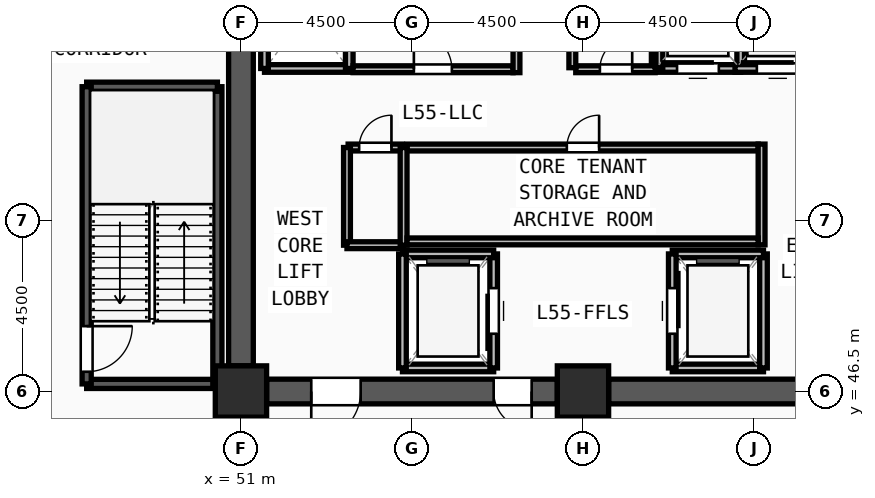
"""IFC4 building model, lengths in metres.
Left out: names, types, materials, properties, quantities, classifications, styles, units other than length and angle.
Written with IfcOpenShell. Run it as: python <this file> out.ifc"""

import sys

from ifc_helpers import new_model, si_unit, direction, frame, frame_2d, origin, origin_2d, place, context, subcontext, project, spatial, rectangle, extrude, source, transform, mapped, element, fill, save


model = new_model("IFC4")
c1 = context("Model", 3, precision=1e-05, world=origin(), true_north=direction((0.0, 1.0)))
c2 = subcontext(c1, "Body", "Model", "MODEL_VIEW")
j1 = project(units=[si_unit("LENGTHUNIT", "METRE"), si_unit("PLANEANGLEUNIT", "RADIAN")], contexts=[c1])
p1 = place(None, origin())
s1 = spatial("IfcSite", under=j1, at=p1, CompositionType="ELEMENT")
p2 = place(p1, origin())
s2 = spatial("IfcBuilding", under=s1, at=p2, CompositionType="ELEMENT")
p3 = place(p2, frame((0.0, 0.0, 213.0)))
s3 = spatial("IfcBuildingStorey", under=s2, at=p3, CompositionType="ELEMENT", Elevation=213.0)
m1 = source(origin(), c2, "Body", "SweptSolid", [
    extrude(rectangle(XDim=1.35, YDim=1.35, at=origin_2d()), origin(), (0.0, 0.0, 1.0), 3.75),
])
for number, where, z_axis, x_axis in (
    (1, (51.0, 46.5, 0.0), (0.0, 0.0, 1.0), (1.0, 0.0, 0.0)),
    (2, (60.0, 46.5, 0.0), (0.0, 0.0, 1.0), (1.0, 0.0, 0.0)),
):
    element("IfcColumn", number, at=place(p3, frame(where, z_axis=z_axis, x_axis=x_axis)), inside=s3, PredefinedType="COLUMN", context=c2, shape_type="MappedRepresentation", body=[
        mapped(m1, transform((0.0, 0.0, 0.0), x_axis=(1.0, 0.0, 0.0), y_axis=(0.0, 1.0, 0.0), z_axis=(0.0, 0.0, 1.0), scale=1.0)),
    ])
p4 = place(p3, frame((68.325, 46.5, 0.0), z_axis=(0.0, 0.0, 1.0), x_axis=(-1.0, 0.0, 0.0)))
e3 = element("IfcWall", 3, at=p4, inside=s3, PredefinedType="SHEAR", context=c2, shape_type="SweptSolid", body=[
    extrude(rectangle(XDim=7.65, YDim=0.65, at=frame_2d((3.825, 0.0))), origin(), (0.0, 0.0, 1.0), 3.57),
])
m2 = source(origin(), c2, "Body", "SweptSolid", [
    extrude(rectangle(XDim=1.3, YDim=2.2, at=frame_2d((0.65, 1.1))), frame((0.0, 0.335, 0.0), z_axis=(0.0, -1.0, 0.0), x_axis=(1.0, 0.0, 0.0)), (0.0, 0.0, 1.0), 0.67),
])
p5 = place(p4, frame((1.175, 0.0, 0.0)))
e4 = element("IfcOpeningElement", 4, at=p5, cuts=e3, PredefinedType="OPENING", context=c2, shape_type="MappedRepresentation", body=[
    mapped(m2, transform((0.0, 0.0, 0.0), x_axis=(1.0, 0.0, 0.0), y_axis=(0.0, 1.0, 0.0), z_axis=(0.0, 0.0, 1.0), scale=1.0)),
])
p6 = place(p3, frame((59.325, 46.5, 0.0), z_axis=(0.0, 0.0, 1.0), x_axis=(-1.0, 0.0, 0.0)))
e5 = element("IfcWall", 5, at=p6, inside=s3, PredefinedType="SHEAR", context=c2, shape_type="SweptSolid", body=[
    extrude(rectangle(XDim=7.65, YDim=0.65, at=frame_2d((3.825, 0.0))), origin(), (0.0, 0.0, 1.0), 3.57),
])
p7 = place(p6, frame((5.175, 0.0, 0.0)))
e6 = element("IfcOpeningElement", 6, at=p7, cuts=e5, PredefinedType="OPENING", context=c2, shape_type="MappedRepresentation", body=[
    mapped(m2, transform((0.0, 0.0, 0.0), x_axis=(1.0, 0.0, 0.0), y_axis=(0.0, 1.0, 0.0), z_axis=(0.0, 0.0, 1.0), scale=1.0)),
])
m3 = source(origin(), c2, "Body", "SweptSolid", [
    extrude(rectangle(XDim=1.0, YDim=2.2, at=frame_2d((0.5, 1.1))), frame((0.0, 0.335, 0.0), z_axis=(0.0, -1.0, 0.0), x_axis=(1.0, 0.0, 0.0)), (0.0, 0.0, 1.0), 0.67),
])
p8 = place(p6, frame((0.675, 0.0, 0.0)))
e7 = element("IfcOpeningElement", 7, at=p8, cuts=e5, PredefinedType="OPENING", context=c2, shape_type="MappedRepresentation", body=[
    mapped(m3, transform((0.0, 0.0, 0.0), x_axis=(1.0, 0.0, 0.0), y_axis=(0.0, 1.0, 0.0), z_axis=(0.0, 0.0, 1.0), scale=1.0)),
])
p9 = place(p3, frame((51.0, 47.175, 0.0), z_axis=(0.0, 0.0, 1.0), x_axis=(0.0, 1.0, 0.0)))
e8 = element("IfcWall", 8, at=p9, inside=s3, PredefinedType="SHEAR", context=c2, shape_type="SweptSolid", body=[
    extrude(rectangle(XDim=13.65, YDim=0.65, at=frame_2d((6.825, 0.0))), origin(), (0.0, 0.0, 1.0), 3.57),
])
p10 = place(p3, frame((46.94, 46.7, 0.0), z_axis=(0.0, 0.0, 1.0), x_axis=(1.0, 0.0, 0.0)))
e9 = element("IfcWall", 9, at=p10, inside=s3, PredefinedType="SOLIDWALL", context=c2, shape_type="SweptSolid", body=[
    extrude(rectangle(XDim=3.44, YDim=0.24, at=frame_2d((1.72, 0.0))), origin(), (0.0, 0.0, 1.0), 3.57),
])
p11 = place(p3, frame((50.38, 46.7, 0.0), z_axis=(0.0, 0.0, 1.0), x_axis=(0.0, 1.0, 0.0)))
e10 = element("IfcWall", 10, at=p11, inside=s3, PredefinedType="SOLIDWALL", context=c2, shape_type="SweptSolid", body=[
    extrude(rectangle(XDim=7.82, YDim=0.24, at=frame_2d((3.91, 0.0))), origin(), (0.0, 0.0, 1.0), 3.57),
])
p12 = place(p3, frame((50.38, 54.52, 0.0), z_axis=(0.0, 0.0, 1.0), x_axis=(-1.0, 0.0, 0.0)))
e11 = element("IfcWall", 11, at=p12, inside=s3, PredefinedType="SOLIDWALL", context=c2, shape_type="SweptSolid", body=[
    extrude(rectangle(XDim=3.44, YDim=0.24, at=frame_2d((1.72, 0.0))), origin(), (0.0, 0.0, 1.0), 3.57),
])
p13 = place(p3, frame((46.94, 54.52, 0.0), z_axis=(0.0, 0.0, 1.0), x_axis=(0.0, -1.0, 0.0)))
e12 = element("IfcWall", 12, at=p13, inside=s3, PredefinedType="SOLIDWALL", context=c2, shape_type="SweptSolid", body=[
    extrude(rectangle(XDim=7.82, YDim=0.24, at=frame_2d((3.91, 0.0))), origin(), (0.0, 0.0, 1.0), 3.57),
])
m4 = source(origin(), c2, "Body", "SweptSolid", [
    extrude(rectangle(XDim=1.2, YDim=2.2, at=frame_2d((0.6, 1.1))), frame((0.0, 0.13, 0.0), z_axis=(0.0, -1.0, 0.0), x_axis=(1.0, 0.0, 0.0)), (0.0, 0.0, 1.0), 0.26),
])
p14 = place(p13, frame((6.3, 0.0, 0.0)))
e13 = element("IfcOpeningElement", 13, at=p14, cuts=e12, PredefinedType="OPENING", context=c2, shape_type="MappedRepresentation", body=[
    mapped(m4, transform((0.0, 0.0, 0.0), x_axis=(1.0, 0.0, 0.0), y_axis=(0.0, 1.0, 0.0), z_axis=(0.0, 0.0, 1.0), scale=1.0)),
])
p15 = place(p3, frame((55.25, 47.12, 0.0), z_axis=(0.0, 0.0, 1.0), x_axis=(1.0, 0.0, 0.0)))
e14 = element("IfcWall", 14, at=p15, inside=s3, PredefinedType="SOLIDWALL", context=c2, shape_type="SweptSolid", body=[
    extrude(rectangle(XDim=2.4, YDim=0.2, at=frame_2d((1.2, 0.0))), origin(), (0.0, 0.0, 1.0), 3.57),
])
p16 = place(p3, frame((57.65, 47.12, 0.0), z_axis=(0.0, 0.0, 1.0), x_axis=(0.0, 1.0, 0.0)))
e15 = element("IfcWall", 15, at=p16, inside=s3, PredefinedType="SOLIDWALL", context=c2, shape_type="SweptSolid", body=[
    extrude(rectangle(XDim=3.0, YDim=0.2, at=frame_2d((1.5, 0.0))), origin(), (0.0, 0.0, 1.0), 3.57),
])
m5 = source(origin(), c2, "Body", "SweptSolid", [
    extrude(rectangle(XDim=1.2, YDim=2.3, at=frame_2d((0.6, 1.15))), frame((0.0, 0.11, 0.0), z_axis=(0.0, -1.0, 0.0), x_axis=(1.0, 0.0, 0.0)), (0.0, 0.0, 1.0), 0.22),
])
p17 = place(p16, frame((0.9, 0.0, 0.0)))
e16 = element("IfcOpeningElement", 16, at=p17, cuts=e15, PredefinedType="OPENING", context=c2, shape_type="MappedRepresentation", body=[
    mapped(m5, transform((0.0, 0.0, 0.0), x_axis=(1.0, 0.0, 0.0), y_axis=(0.0, 1.0, 0.0), z_axis=(0.0, 0.0, 1.0), scale=1.0)),
])
p18 = place(p3, frame((57.65, 50.12, 0.0), z_axis=(0.0, 0.0, 1.0), x_axis=(-1.0, 0.0, 0.0)))
e17 = element("IfcWall", 17, at=p18, inside=s3, PredefinedType="SOLIDWALL", context=c2, shape_type="SweptSolid", body=[
    extrude(rectangle(XDim=2.4, YDim=0.2, at=frame_2d((1.2, 0.0))), origin(), (0.0, 0.0, 1.0), 3.57),
])
p19 = place(p3, frame((55.25, 50.12, 0.0), z_axis=(0.0, 0.0, 1.0), x_axis=(0.0, -1.0, 0.0)))
e18 = element("IfcWall", 18, at=p19, inside=s3, PredefinedType="SOLIDWALL", context=c2, shape_type="SweptSolid", body=[
    extrude(rectangle(XDim=3.0, YDim=0.2, at=frame_2d((1.5, 0.0))), origin(), (0.0, 0.0, 1.0), 3.57),
])
p20 = place(p3, frame((62.35, 47.12, 0.0), z_axis=(0.0, 0.0, 1.0), x_axis=(1.0, 0.0, 0.0)))
e19 = element("IfcWall", 19, at=p20, inside=s3, PredefinedType="SOLIDWALL", context=c2, shape_type="SweptSolid", body=[
    extrude(rectangle(XDim=2.4, YDim=0.2, at=frame_2d((1.2, 0.0))), origin(), (0.0, 0.0, 1.0), 3.57),
])
p21 = place(p3, frame((64.75, 47.12, 0.0), z_axis=(0.0, 0.0, 1.0), x_axis=(0.0, 1.0, 0.0)))
e20 = element("IfcWall", 20, at=p21, inside=s3, PredefinedType="SOLIDWALL", context=c2, shape_type="SweptSolid", body=[
    extrude(rectangle(XDim=3.0, YDim=0.2, at=frame_2d((1.5, 0.0))), origin(), (0.0, 0.0, 1.0), 3.57),
])
p22 = place(p3, frame((64.75, 50.12, 0.0), z_axis=(0.0, 0.0, 1.0), x_axis=(-1.0, 0.0, 0.0)))
e21 = element("IfcWall", 21, at=p22, inside=s3, PredefinedType="SOLIDWALL", context=c2, shape_type="SweptSolid", body=[
    extrude(rectangle(XDim=2.4, YDim=0.2, at=frame_2d((1.2, 0.0))), origin(), (0.0, 0.0, 1.0), 3.57),
])
p23 = place(p3, frame((62.35, 50.12, 0.0), z_axis=(0.0, 0.0, 1.0), x_axis=(0.0, -1.0, 0.0)))
e22 = element("IfcWall", 22, at=p23, inside=s3, PredefinedType="SOLIDWALL", context=c2, shape_type="SweptSolid", body=[
    extrude(rectangle(XDim=3.0, YDim=0.2, at=frame_2d((1.5, 0.0))), origin(), (0.0, 0.0, 1.0), 3.57),
])
p24 = place(p23, frame((0.9, 0.0, 0.0)))
e23 = element("IfcOpeningElement", 23, at=p24, cuts=e22, PredefinedType="OPENING", context=c2, shape_type="MappedRepresentation", body=[
    mapped(m5, transform((0.0, 0.0, 0.0), x_axis=(1.0, 0.0, 0.0), y_axis=(0.0, 1.0, 0.0), z_axis=(0.0, 0.0, 1.0), scale=1.0)),
])
p25 = place(p3, frame((51.62, 55.0, 0.0), z_axis=(0.0, 0.0, 1.0), x_axis=(1.0, 0.0, 0.0)))
e24 = element("IfcWall", 24, at=p25, inside=s3, PredefinedType="SOLIDWALL", context=c2, shape_type="SweptSolid", body=[
    extrude(rectangle(XDim=2.23, YDim=0.2, at=frame_2d((1.115, 0.0))), origin(), (0.0, 0.0, 1.0), 3.57),
])
for number, where, z_axis, x_axis in (
    (25, (53.85, 55.0, 0.0), (0.0, 0.0, 1.0), (0.0, 1.0, 0.0)),
    (26, (51.62, 58.0, 0.0), (0.0, 0.0, 1.0), (0.0, -1.0, 0.0)),
):
    element("IfcWall", number, at=place(p3, frame(where, z_axis=z_axis, x_axis=x_axis)), inside=s3, PredefinedType="SOLIDWALL", context=c2, shape_type="SweptSolid", body=[
        extrude(rectangle(XDim=3.0, YDim=0.2, at=frame_2d((1.5, 0.0))), origin(), (0.0, 0.0, 1.0), 3.57),
    ])
p26 = place(p3, frame((61.9, 55.0, 0.0), z_axis=(0.0, 0.0, 1.0), x_axis=(1.0, 0.0, 0.0)))
e27 = element("IfcWall", 27, at=p26, inside=s3, PredefinedType="SOLIDWALL", context=c2, shape_type="SweptSolid", body=[
    extrude(rectangle(XDim=2.25, YDim=0.2, at=frame_2d((1.125, 0.0))), origin(), (0.0, 0.0, 1.0), 3.57),
])
m6 = source(origin(), c2, "Body", "SweptSolid", [
    extrude(rectangle(XDim=1.1, YDim=2.2, at=frame_2d((0.55, 1.1))), frame((0.0, 0.11, 0.0), z_axis=(0.0, -1.0, 0.0), x_axis=(1.0, 0.0, 0.0)), (0.0, 0.0, 1.0), 0.22),
])
p27 = place(p26, frame((0.575, 0.0, 0.0)))
e28 = element("IfcOpeningElement", 28, at=p27, cuts=e27, PredefinedType="OPENING", context=c2, shape_type="MappedRepresentation", body=[
    mapped(m6, transform((0.0, 0.0, 0.0), x_axis=(1.0, 0.0, 0.0), y_axis=(0.0, 1.0, 0.0), z_axis=(0.0, 0.0, 1.0), scale=1.0)),
])
for number, where, z_axis, x_axis in (
    (29, (64.15, 55.0, 0.0), (0.0, 0.0, 1.0), (0.0, 1.0, 0.0)),
    (30, (61.9, 57.6, 0.0), (0.0, 0.0, 1.0), (0.0, -1.0, 0.0)),
):
    element("IfcWall", number, at=place(p3, frame(where, z_axis=z_axis, x_axis=x_axis)), inside=s3, PredefinedType="SOLIDWALL", context=c2, shape_type="SweptSolid", body=[
        extrude(rectangle(XDim=2.6, YDim=0.2, at=frame_2d((1.3, 0.0))), origin(), (0.0, 0.0, 1.0), 3.57),
    ])
p28 = place(p3, frame((64.0, 55.0, 0.0), z_axis=(0.0, 0.0, 1.0), x_axis=(1.0, 0.0, 0.0)))
e31 = element("IfcWall", 31, at=p28, inside=s3, PredefinedType="SOLIDWALL", context=c2, shape_type="SweptSolid", body=[
    extrude(rectangle(XDim=2.25, YDim=0.2, at=frame_2d((1.125, 0.0))), origin(), (0.0, 0.0, 1.0), 3.57),
])
p29 = place(p28, frame((0.575, 0.0, 0.0)))
e32 = element("IfcOpeningElement", 32, at=p29, cuts=e31, PredefinedType="OPENING", context=c2, shape_type="MappedRepresentation", body=[
    mapped(m6, transform((0.0, 0.0, 0.0), x_axis=(1.0, 0.0, 0.0), y_axis=(0.0, 1.0, 0.0), z_axis=(0.0, 0.0, 1.0), scale=1.0)),
])
p30 = place(p3, frame((55.37, 52.92, 0.0), z_axis=(0.0, 0.0, 1.0), x_axis=(1.0, 0.0, 0.0)))
e33 = element("IfcWall", 33, at=p30, inside=s3, PredefinedType="PARTITIONING", context=c2, shape_type="SweptSolid", body=[
    extrude(rectangle(XDim=9.24, YDim=0.18, at=frame_2d((4.62, 0.0))), origin(), (0.0, 0.0, 1.0), 3.57),
])
m7 = source(origin(), c2, "Body", "SweptSolid", [
    extrude(rectangle(XDim=0.85, YDim=2.1, at=frame_2d((0.425, 1.05))), frame((0.0, 0.1, 0.0), z_axis=(0.0, -1.0, 0.0), x_axis=(1.0, 0.0, 0.0)), (0.0, 0.0, 1.0), 0.2),
])
p31 = place(p30, frame((4.205, 0.0, 0.0)))
e34 = element("IfcOpeningElement", 34, at=p31, cuts=e33, PredefinedType="OPENING", context=c2, shape_type="MappedRepresentation", body=[
    mapped(m7, transform((0.0, 0.0, 0.0), x_axis=(1.0, 0.0, 0.0), y_axis=(0.0, 1.0, 0.0), z_axis=(0.0, 0.0, 1.0), scale=1.0)),
])
p32 = place(p3, frame((53.95, 54.98, 0.0), z_axis=(0.0, 0.0, 1.0), x_axis=(1.0, 0.0, 0.0)))
e35 = element("IfcWall", 35, at=p32, inside=s3, PredefinedType="PARTITIONING", context=c2, shape_type="SweptSolid", body=[
    extrude(rectangle(XDim=4.21, YDim=0.18, at=frame_2d((2.105, 0.0))), origin(), (0.0, 0.0, 1.0), 3.57),
])
m8 = source(origin(), c2, "Body", "SweptSolid", [
    extrude(rectangle(XDim=1.0, YDim=2.2, at=frame_2d((0.5, 1.1))), frame((0.0, 0.1, 0.0), z_axis=(0.0, -1.0, 0.0), x_axis=(1.0, 0.0, 0.0)), (0.0, 0.0, 1.0), 0.2),
])
p33 = place(p32, frame((1.6, 0.0, 0.0)))
e36 = element("IfcOpeningElement", 36, at=p33, cuts=e35, PredefinedType="OPENING", context=c2, shape_type="MappedRepresentation", body=[
    mapped(m8, transform((0.0, 0.0, 0.0), x_axis=(1.0, 0.0, 0.0), y_axis=(0.0, 1.0, 0.0), z_axis=(0.0, 0.0, 1.0), scale=1.0)),
])
p34 = place(p3, frame((59.81, 54.98, 0.0), z_axis=(0.0, 0.0, 1.0), x_axis=(1.0, 0.0, 0.0)))
e37 = element("IfcWall", 37, at=p34, inside=s3, PredefinedType="PARTITIONING", context=c2, shape_type="SweptSolid", body=[
    extrude(rectangle(XDim=2.09, YDim=0.18, at=frame_2d((1.045, 0.0))), origin(), (0.0, 0.0, 1.0), 3.57),
])
p35 = place(p34, frame((0.635, 0.0, 0.0)))
e38 = element("IfcOpeningElement", 38, at=p35, cuts=e37, PredefinedType="OPENING", context=c2, shape_type="MappedRepresentation", body=[
    mapped(m7, transform((0.0, 0.0, 0.0), x_axis=(1.0, 0.0, 0.0), y_axis=(0.0, 1.0, 0.0), z_axis=(0.0, 0.0, 1.0), scale=1.0)),
])
p36 = place(p3, frame((53.82, 52.92, 0.0), z_axis=(0.0, 0.0, 1.0), x_axis=(1.0, 0.0, 0.0)))
e39 = element("IfcWall", 39, at=p36, inside=s3, PredefinedType="PARTITIONING", context=c2, shape_type="SweptSolid", body=[
    extrude(rectangle(XDim=1.43, YDim=0.18, at=frame_2d((0.715, 0.0))), origin(), (0.0, 0.0, 1.0), 3.57),
])
p37 = place(p36, frame((0.29, 0.0, 0.0)))
e40 = element("IfcOpeningElement", 40, at=p37, cuts=e39, PredefinedType="OPENING", context=c2, shape_type="MappedRepresentation", body=[
    mapped(m7, transform((0.0, 0.0, 0.0), x_axis=(1.0, 0.0, 0.0), y_axis=(0.0, 1.0, 0.0), z_axis=(0.0, 0.0, 1.0), scale=1.0)),
])
for number, where, z_axis, x_axis in (
    (41, (59.72, 55.02, 0.0), (0.0, 0.0, 1.0), (0.0, 1.0, 0.0)),
    (42, (62.01, 55.02, 0.0), (0.0, 0.0, 1.0), (0.0, 1.0, 0.0)),
):
    element("IfcWall", number, at=place(p3, frame(where, z_axis=z_axis, x_axis=x_axis)), inside=s3, PredefinedType="PARTITIONING", context=c2, shape_type="SweptSolid", body=[
        extrude(rectangle(XDim=2.88, YDim=0.18, at=frame_2d((1.44, 0.0))), origin(), (0.0, 0.0, 1.0), 3.57),
    ])
p38 = place(p3, frame((53.79, 50.35, 0.0), z_axis=(0.0, 0.0, 1.0), x_axis=(0.0, 1.0, 0.0)))
e43 = element("IfcWall", 43, at=p38, inside=s3, PredefinedType="PARTITIONING", context=c2, shape_type="SweptSolid", body=[
    extrude(rectangle(XDim=2.57, YDim=0.18, at=frame_2d((1.285, 0.0))), origin(), (0.0, 0.0, 1.0), 3.57),
])
p39 = place(p3, frame((53.79, 50.35, 0.0), z_axis=(0.0, 0.0, 1.0), x_axis=(1.0, 0.0, 0.0)))
e44 = element("IfcWall", 44, at=p39, inside=s3, PredefinedType="PARTITIONING", context=c2, shape_type="SweptSolid", body=[
    extrude(rectangle(XDim=1.49, YDim=0.18, at=frame_2d((0.745, 0.0))), origin(), (0.0, 0.0, 1.0), 3.57),
])
p40 = place(p3, frame((55.28, 50.35, 0.0), z_axis=(0.0, 0.0, 1.0), x_axis=(0.0, 1.0, 0.0)))
e45 = element("IfcWall", 45, at=p40, inside=s3, PredefinedType="PARTITIONING", context=c2, shape_type="SweptSolid", body=[
    extrude(rectangle(XDim=2.57, YDim=0.18, at=frame_2d((1.285, 0.0))), origin(), (0.0, 0.0, 1.0), 3.57),
])
p41 = place(p3, frame((64.7, 50.36, 0.0), z_axis=(0.0, 0.0, 1.0), x_axis=(0.0, 1.0, 0.0)))
e46 = element("IfcWall", 46, at=p41, inside=s3, PredefinedType="PARTITIONING", context=c2, shape_type="SweptSolid", body=[
    extrude(rectangle(XDim=2.65, YDim=0.18, at=frame_2d((1.325, 0.0))), origin(), (0.0, 0.0, 1.0), 3.57),
])
p42 = place(p3, frame((55.37, 50.45, 0.0), z_axis=(0.0, 0.0, 1.0), x_axis=(1.0, 0.0, 0.0)))
e47 = element("IfcWall", 47, at=p42, inside=s3, PredefinedType="PARTITIONING", context=c2, shape_type="SweptSolid", body=[
    extrude(rectangle(XDim=9.24, YDim=0.18, at=frame_2d((4.62, 0.0))), origin(), (0.0, 0.0, 1.0), 3.57),
])
p43 = place(p3, frame((58.25, 54.89, 0.0), z_axis=(0.0, 0.0, 1.0), x_axis=(0.0, 1.0, 0.0)))
e48 = element("IfcWall", 48, at=p43, inside=s3, PredefinedType="PARTITIONING", context=c2, shape_type="SweptSolid", body=[
    extrude(rectangle(XDim=3.02, YDim=0.18, at=frame_2d((1.51, 0.0))), origin(), (0.0, 0.0, 1.0), 3.57),
])
m9 = source(origin(), c2, "Body", "SweptSolid", [
    extrude(rectangle(XDim=1.3, YDim=2.2, at=frame_2d((0.65, 1.1))), frame((0.0, 0.025, 0.0), z_axis=(0.0, -1.0, 0.0), x_axis=(1.0, 0.0, 0.0)), (0.0, 0.0, 1.0), 0.05),
])
p44 = place(p7, origin())
e49 = element("IfcDoor", 49, at=p44, inside=s3, OperationType="SINGLE_SWING_RIGHT", PredefinedType="DOOR", context=c2, shape_type="MappedRepresentation", body=[
    mapped(m9, transform((0.0, 0.0, 0.0), x_axis=(1.0, 0.0, 0.0), y_axis=(0.0, 1.0, 0.0), z_axis=(0.0, 0.0, 1.0), scale=1.0)),
])
fill(e6, e49)
m10 = source(origin(), c2, "Body", "SweptSolid", [
    extrude(rectangle(XDim=1.0, YDim=2.2, at=frame_2d((0.5, 1.1))), frame((0.0, 0.025, 0.0), z_axis=(0.0, -1.0, 0.0), x_axis=(1.0, 0.0, 0.0)), (0.0, 0.0, 1.0), 0.05),
])
p45 = place(p8, origin())
e50 = element("IfcDoor", 50, at=p45, inside=s3, OperationType="SINGLE_SWING_LEFT", PredefinedType="DOOR", context=c2, shape_type="MappedRepresentation", body=[
    mapped(m10, transform((0.0, 0.0, 0.0), x_axis=(1.0, 0.0, 0.0), y_axis=(0.0, 1.0, 0.0), z_axis=(0.0, 0.0, 1.0), scale=1.0)),
])
fill(e7, e50)
m11 = source(origin(), c2, "Body", "SweptSolid", [
    extrude(rectangle(XDim=1.2, YDim=2.2, at=frame_2d((0.6, 1.1))), frame((0.0, 0.025, 0.0), z_axis=(0.0, -1.0, 0.0), x_axis=(1.0, 0.0, 0.0)), (0.0, 0.0, 1.0), 0.05),
])
p46 = place(p14, origin())
e51 = element("IfcDoor", 51, at=p46, inside=s3, OperationType="SINGLE_SWING_LEFT", PredefinedType="DOOR", context=c2, shape_type="MappedRepresentation", body=[
    mapped(m11, transform((0.0, 0.0, 0.0), x_axis=(1.0, 0.0, 0.0), y_axis=(0.0, 1.0, 0.0), z_axis=(0.0, 0.0, 1.0), scale=1.0)),
])
fill(e13, e51)
m12 = source(origin(), c2, "Body", "SweptSolid", [
    extrude(rectangle(XDim=1.2, YDim=2.3, at=frame_2d((0.6, 1.15))), frame((0.0, 0.025, 0.0), z_axis=(0.0, -1.0, 0.0), x_axis=(1.0, 0.0, 0.0)), (0.0, 0.0, 1.0), 0.05),
])
p47 = place(p17, origin())
e52 = element("IfcDoor", 52, at=p47, inside=s3, OperationType="SLIDING_TO_LEFT", PredefinedType="DOOR", context=c2, shape_type="MappedRepresentation", body=[
    mapped(m12, transform((0.0, 0.0, 0.0), x_axis=(1.0, 0.0, 0.0), y_axis=(0.0, 1.0, 0.0), z_axis=(0.0, 0.0, 1.0), scale=1.0)),
])
fill(e16, e52)
p48 = place(p24, origin())
e53 = element("IfcDoor", 53, at=p48, inside=s3, OperationType="SLIDING_TO_LEFT", PredefinedType="DOOR", context=c2, shape_type="MappedRepresentation", body=[
    mapped(m12, transform((0.0, 0.0, 0.0), x_axis=(1.0, 0.0, 0.0), y_axis=(0.0, 1.0, 0.0), z_axis=(0.0, 0.0, 1.0), scale=1.0)),
])
fill(e23, e53)
m13 = source(origin(), c2, "Body", "SweptSolid", [
    extrude(rectangle(XDim=1.1, YDim=2.2, at=frame_2d((0.55, 1.1))), frame((0.0, 0.025, 0.0), z_axis=(0.0, -1.0, 0.0), x_axis=(1.0, 0.0, 0.0)), (0.0, 0.0, 1.0), 0.05),
])
p49 = place(p27, origin())
e54 = element("IfcDoor", 54, at=p49, inside=s3, OperationType="SLIDING_TO_LEFT", PredefinedType="DOOR", context=c2, shape_type="MappedRepresentation", body=[
    mapped(m13, transform((0.0, 0.0, 0.0), x_axis=(1.0, 0.0, 0.0), y_axis=(0.0, 1.0, 0.0), z_axis=(0.0, 0.0, 1.0), scale=1.0)),
])
fill(e28, e54)
p50 = place(p29, origin())
e55 = element("IfcDoor", 55, at=p50, inside=s3, OperationType="SLIDING_TO_LEFT", PredefinedType="DOOR", context=c2, shape_type="MappedRepresentation", body=[
    mapped(m13, transform((0.0, 0.0, 0.0), x_axis=(1.0, 0.0, 0.0), y_axis=(0.0, 1.0, 0.0), z_axis=(0.0, 0.0, 1.0), scale=1.0)),
])
fill(e32, e55)
m14 = source(origin(), c2, "Body", "SweptSolid", [
    extrude(rectangle(XDim=0.85, YDim=2.1, at=frame_2d((0.425, 1.05))), frame((0.0, 0.025, 0.0), z_axis=(0.0, -1.0, 0.0), x_axis=(1.0, 0.0, 0.0)), (0.0, 0.0, 1.0), 0.05),
])
p51 = place(p31, origin())
e56 = element("IfcDoor", 56, at=p51, inside=s3, OperationType="SINGLE_SWING_RIGHT", PredefinedType="DOOR", context=c2, shape_type="MappedRepresentation", body=[
    mapped(m14, transform((0.0, 0.0, 0.0), x_axis=(1.0, 0.0, 0.0), y_axis=(0.0, 1.0, 0.0), z_axis=(0.0, 0.0, 1.0), scale=1.0)),
])
fill(e34, e56)
p52 = place(p33, origin())
e57 = element("IfcDoor", 57, at=p52, inside=s3, OperationType="SINGLE_SWING_LEFT", PredefinedType="DOOR", context=c2, shape_type="MappedRepresentation", body=[
    mapped(m10, transform((0.0, 0.0, 0.0), x_axis=(1.0, 0.0, 0.0), y_axis=(0.0, 1.0, 0.0), z_axis=(0.0, 0.0, 1.0), scale=1.0)),
])
fill(e36, e57)
p53 = place(p35, origin())
e58 = element("IfcDoor", 58, at=p53, inside=s3, OperationType="SINGLE_SWING_RIGHT", PredefinedType="DOOR", context=c2, shape_type="MappedRepresentation", body=[
    mapped(m14, transform((0.0, 0.0, 0.0), x_axis=(1.0, 0.0, 0.0), y_axis=(0.0, 1.0, 0.0), z_axis=(0.0, 0.0, 1.0), scale=1.0)),
])
fill(e38, e58)
p54 = place(p37, origin())
e59 = element("IfcDoor", 59, at=p54, inside=s3, OperationType="SINGLE_SWING_RIGHT", PredefinedType="DOOR", context=c2, shape_type="MappedRepresentation", body=[
    mapped(m14, transform((0.0, 0.0, 0.0), x_axis=(1.0, 0.0, 0.0), y_axis=(0.0, 1.0, 0.0), z_axis=(0.0, 0.0, 1.0), scale=1.0)),
])
fill(e40, e59)
save(model, sys.argv[1])
